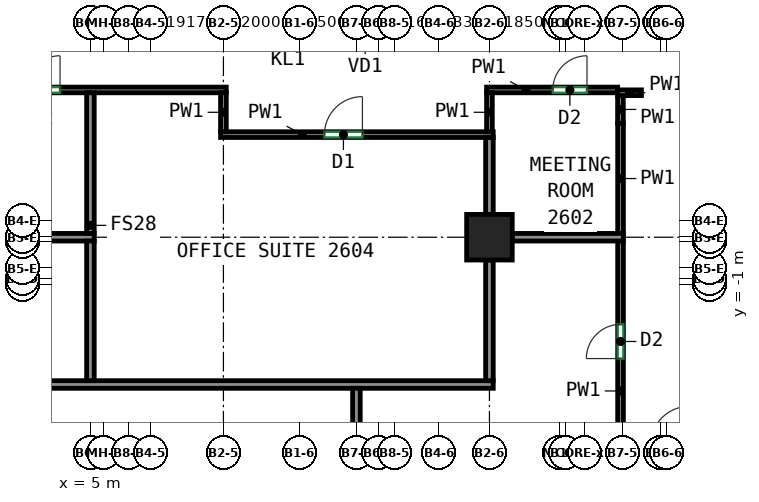
"""IFC4 building model, lengths in metres.
Left out: names, types, materials, properties, quantities, classifications, styles, units other than length and angle.
Written with IfcOpenShell. Run it as: python <this file> out.ifc"""

import sys

from ifc_helpers import new_model, si_unit, direction, frame, frame_2d, origin, origin_2d, place, context, subcontext, project, spatial, rectangle, extrude, source, transform, mapped, element, fill, save


model = new_model("IFC4")
c1 = context("Model", 3, precision=1e-05, world=origin(), true_north=direction((0.0, 1.0)))
c2 = subcontext(c1, "Body", "Model", "MODEL_VIEW")
j1 = project(units=[si_unit("LENGTHUNIT", "METRE"), si_unit("PLANEANGLEUNIT", "RADIAN")], contexts=[c1])
p1 = place(None, origin())
s1 = spatial("IfcSite", under=j1, at=p1, CompositionType="ELEMENT")
p2 = place(p1, origin())
s2 = spatial("IfcBuilding", under=s1, at=p2, CompositionType="ELEMENT")
p3 = place(p2, frame((0.0, 0.0, 112.6)))
s3 = spatial("IfcBuildingStorey", under=s2, at=p3, CompositionType="ELEMENT", Elevation=112.6)
m1 = source(origin(), c2, "Body", "SweptSolid", [
    extrude(rectangle(XDim=1.2, YDim=1.2, at=origin_2d()), origin(), (0.0, 0.0, 1.0), 3.72),
])
p4 = place(p3, frame((15.5, 0.25, 0.0), z_axis=(0.0, 0.0, 1.0), x_axis=(1.0, 0.0, 0.0)))
e1 = element("IfcColumn", 1, at=p4, inside=s3, PredefinedType="COLUMN", context=c2, shape_type="MappedRepresentation", body=[
    mapped(m1, transform((0.0, 0.0, 0.0))),
])
p5 = place(p3, frame((-2.075, 4.125, 0.0), z_axis=(0.0, 0.0, 1.0), x_axis=(1.0, 0.0, 0.0)))
e2 = element("IfcWall", 2, at=p5, inside=s3, PredefinedType="PARTITIONING", context=c2, shape_type="SweptSolid", body=[
    extrude(rectangle(XDim=10.65, YDim=0.15, at=frame_2d((5.325, 0.0))), origin(), (0.0, 0.0, 1.0), 3.72),
])
p6 = place(p5, frame((5.376, 0.0, 0.0)))
e3 = element("IfcOpeningElement", 3, at=p6, cuts=e2, PredefinedType="OPENING", context=c2, shape_type="SweptSolid", body=[
    extrude(rectangle(XDim=0.9, YDim=2.1, at=frame_2d((0.45, 1.05))), frame((0.0, 0.085, 0.0), z_axis=(0.0, -1.0, 0.0), x_axis=(1.0, 0.0, 0.0)), (0.0, 0.0, 1.0), 0.17),
])
p7 = place(p3, frame((8.425, 2.95, 0.0), z_axis=(0.0, 0.0, 1.0), x_axis=(1.0, 0.0, 0.0)))
e4 = element("IfcWall", 4, at=p7, inside=s3, PredefinedType="PARTITIONING", context=c2, shape_type="SweptSolid", body=[
    extrude(rectangle(XDim=7.175, YDim=0.15, at=frame_2d((3.587, 0.0))), origin(), (0.0, 0.0, 1.0), 3.72),
])
p8 = place(p7, frame((2.733, 0.0, 0.0)))
e5 = element("IfcOpeningElement", 5, at=p8, cuts=e4, PredefinedType="OPENING", context=c2, shape_type="SweptSolid", body=[
    extrude(rectangle(XDim=1.0, YDim=2.1, at=frame_2d((0.5, 1.05))), frame((0.0, 0.085, 0.0), z_axis=(0.0, -1.0, 0.0), x_axis=(1.0, 0.0, 0.0)), (0.0, 0.0, 1.0), 0.17),
])
p9 = place(p3, frame((8.5, 4.05, 0.0), z_axis=(0.0, 0.0, 1.0), x_axis=(0.0, -1.0, 0.0)))
e6 = element("IfcWall", 6, at=p9, inside=s3, PredefinedType="PARTITIONING", context=c2, shape_type="SweptSolid", body=[
    extrude(rectangle(XDim=1.025, YDim=0.15, at=frame_2d((0.513, 0.0))), origin(), (0.0, 0.0, 1.0), 3.72),
])
p10 = place(p3, frame((18.95, -7.75, 0.0), z_axis=(0.0, 0.0, 1.0), x_axis=(0.0, 1.0, 0.0)))
e7 = element("IfcWall", 7, at=p10, inside=s3, PredefinedType="PARTITIONING", context=c2, shape_type="SweptSolid", body=[
    extrude(rectangle(XDim=7.91, YDim=0.15, at=frame_2d((3.955, 0.0))), origin(), (0.0, 0.0, 1.0), 3.72),
])
p11 = place(p10, frame((4.807, 0.0, 0.0)))
e8 = element("IfcOpeningElement", 8, at=p11, cuts=e7, PredefinedType="OPENING", context=c2, shape_type="SweptSolid", body=[
    extrude(rectangle(XDim=0.9, YDim=2.1, at=frame_2d((0.45, 1.05))), frame((0.0, 0.085, 0.0), z_axis=(0.0, -1.0, 0.0), x_axis=(1.0, 0.0, 0.0)), (0.0, 0.0, 1.0), 0.17),
])
p12 = place(p3, frame((18.95, 0.34, 0.0), z_axis=(0.0, 0.0, 1.0), x_axis=(0.0, 1.0, 0.0)))
e9 = element("IfcWall", 9, at=p12, inside=s3, PredefinedType="PARTITIONING", context=c2, shape_type="SweptSolid", body=[
    extrude(rectangle(XDim=2.908, YDim=0.15, at=frame_2d((1.454, 0.0))), origin(), (0.0, 0.0, 1.0), 3.72),
])
p13 = place(p3, frame((18.948, 3.977, 0.0), z_axis=(0.0, 0.0, 1.0), x_axis=(0.0, -1.0, 0.0)))
e10 = element("IfcWall", 10, at=p13, inside=s3, PredefinedType="PARTITIONING", context=c2, shape_type="SweptSolid", body=[
    extrude(rectangle(XDim=0.729, YDim=0.15, at=frame_2d((0.365, 0.0))), origin(), (0.0, 0.0, 1.0), 3.72),
])
p14 = place(p3, frame((18.873, 4.052, 0.0), z_axis=(0.0, 0.0, 1.0), x_axis=(1.0, 0.0, 0.0)))
e11 = element("IfcWall", 11, at=p14, inside=s3, PredefinedType="PARTITIONING", context=c2, shape_type="SweptSolid", body=[
    extrude(rectangle(XDim=0.627, YDim=0.15, at=frame_2d((0.313, 0.0))), origin(), (0.0, 0.0, 1.0), 3.72),
])
p15 = place(p3, frame((15.425, 4.125, 0.0), z_axis=(0.0, 0.0, 1.0), x_axis=(1.0, 0.0, 0.0)))
e12 = element("IfcWall", 12, at=p15, inside=s3, PredefinedType="PARTITIONING", context=c2, shape_type="SweptSolid", body=[
    extrude(rectangle(XDim=3.448, YDim=0.15, at=frame_2d((1.724, 0.0))), origin(), (0.0, 0.0, 1.0), 3.72),
])
p16 = place(p15, frame((1.742, 0.0, 0.0)))
e13 = element("IfcOpeningElement", 13, at=p16, cuts=e12, PredefinedType="OPENING", context=c2, shape_type="SweptSolid", body=[
    extrude(rectangle(XDim=0.9, YDim=2.1, at=frame_2d((0.45, 1.05))), frame((0.0, 0.085, 0.0), z_axis=(0.0, -1.0, 0.0), x_axis=(1.0, 0.0, 0.0)), (0.0, 0.0, 1.0), 0.17),
])
p17 = place(p3, frame((15.5, 3.025, 0.0), z_axis=(0.0, 0.0, 1.0), x_axis=(0.0, 1.0, 0.0)))
e14 = element("IfcWall", 14, at=p17, inside=s3, PredefinedType="PARTITIONING", context=c2, shape_type="SweptSolid", body=[
    extrude(rectangle(XDim=1.025, YDim=0.15, at=frame_2d((0.513, 0.0))), origin(), (0.0, 0.0, 1.0), 3.72),
])
p18 = place(p3, frame((-17.874, -3.625, 0.0), z_axis=(0.0, 0.0, 1.0), x_axis=(1.0, 0.0, 0.0)))
e15 = element("IfcWall", 15, at=p18, inside=s3, PredefinedType="PARTITIONING", context=c2, shape_type="SweptSolid", body=[
    extrude(rectangle(XDim=33.474, YDim=0.2, at=frame_2d((16.737, 0.0))), origin(), (0.0, 0.0, 1.0), 3.72),
])
p19 = place(p3, frame((12.0, -11.275, 0.0), z_axis=(0.0, 0.0, 1.0), x_axis=(0.0, 1.0, 0.0)))
e16 = element("IfcWall", 16, at=p19, inside=s3, PredefinedType="PARTITIONING", context=c2, shape_type="SweptSolid", body=[
    extrude(rectangle(XDim=7.55, YDim=0.2, at=frame_2d((3.775, 0.0))), origin(), (0.0, 0.0, 1.0), 3.72),
])
p20 = place(p3, frame((-2.1, 0.25, 0.0), z_axis=(0.0, 0.0, 1.0), x_axis=(1.0, 0.0, 0.0)))
e17 = element("IfcWall", 17, at=p20, inside=s3, PredefinedType="PARTITIONING", context=c2, shape_type="SweptSolid", body=[
    extrude(rectangle(XDim=7.2, YDim=0.2, at=frame_2d((3.6, 0.0))), origin(), (0.0, 0.0, 1.0), 3.07),
])
p21 = place(p3, frame((5.0, -3.525, 0.0), z_axis=(0.0, 0.0, 1.0), x_axis=(0.0, 1.0, 0.0)))
e18 = element("IfcWall", 18, at=p21, inside=s3, PredefinedType="PARTITIONING", context=c2, shape_type="SweptSolid", body=[
    extrude(rectangle(XDim=3.675, YDim=0.2, at=frame_2d((1.837, 0.0))), origin(), (0.0, 0.0, 1.0), 3.72),
])
p22 = place(p3, frame((5.0, 0.35, 0.0), z_axis=(0.0, 0.0, 1.0), x_axis=(0.0, 1.0, 0.0)))
e19 = element("IfcWall", 19, at=p22, inside=s3, PredefinedType="PARTITIONING", context=c2, shape_type="SweptSolid", body=[
    extrude(rectangle(XDim=3.699, YDim=0.2, at=frame_2d((1.85, 0.0))), origin(), (0.0, 0.0, 1.0), 3.72),
])
p23 = place(p3, frame((15.5, -3.525, 0.0), z_axis=(0.0, 0.0, 1.0), x_axis=(0.0, 1.0, 0.0)))
e20 = element("IfcWall", 20, at=p23, inside=s3, PredefinedType="PARTITIONING", context=c2, shape_type="SweptSolid", body=[
    extrude(rectangle(XDim=3.175, YDim=0.2, at=frame_2d((1.587, 0.0))), origin(), (0.0, 0.0, 1.0), 3.72),
])
p24 = place(p3, frame((15.5, 0.85, 0.0), z_axis=(0.0, 0.0, 1.0), x_axis=(0.0, 1.0, 0.0)))
e21 = element("IfcWall", 21, at=p24, inside=s3, PredefinedType="PARTITIONING", context=c2, shape_type="SweptSolid", body=[
    extrude(rectangle(XDim=2.024, YDim=0.2, at=frame_2d((1.012, 0.0))), origin(), (0.0, 0.0, 1.0), 3.72),
])
p25 = place(p3, frame((16.1, 0.25, 0.0), z_axis=(0.0, 0.0, 1.0), x_axis=(1.0, 0.0, 0.0)))
e22 = element("IfcWall", 22, at=p25, inside=s3, PredefinedType="PARTITIONING", context=c2, shape_type="SweptSolid", body=[
    extrude(rectangle(XDim=2.924, YDim=0.2, at=frame_2d((1.462, 0.0))), origin(), (0.0, 0.0, 1.0), 3.72),
])
p26 = place(p11, origin())
e23 = element("IfcDoor", 23, at=p26, inside=s3, OperationType="SINGLE_SWING_LEFT", PredefinedType="DOOR", context=c2, shape_type="SweptSolid", body=[
    extrude(rectangle(XDim=0.9, YDim=2.1, at=frame_2d((0.45, 1.05))), frame((0.0, 0.025, 0.0), z_axis=(0.0, -1.0, 0.0), x_axis=(1.0, 0.0, 0.0)), (0.0, 0.0, 1.0), 0.05),
])
fill(e8, e23)
p27 = place(p8, origin())
e24 = element("IfcDoor", 24, at=p27, inside=s3, OperationType="SINGLE_SWING_RIGHT", PredefinedType="DOOR", context=c2, shape_type="SweptSolid", body=[
    extrude(rectangle(XDim=1.0, YDim=2.1, at=frame_2d((0.5, 1.05))), frame((0.0, 0.025, 0.0), z_axis=(0.0, -1.0, 0.0), x_axis=(1.0, 0.0, 0.0)), (0.0, 0.0, 1.0), 0.05),
])
fill(e5, e24)
p28 = place(p6, origin())
e25 = element("IfcDoor", 25, at=p28, inside=s3, OperationType="SINGLE_SWING_RIGHT", PredefinedType="DOOR", context=c2, shape_type="SweptSolid", body=[
    extrude(rectangle(XDim=0.9, YDim=2.1, at=frame_2d((0.45, 1.05))), frame((0.0, 0.025, 0.0), z_axis=(0.0, -1.0, 0.0), x_axis=(1.0, 0.0, 0.0)), (0.0, 0.0, 1.0), 0.05),
])
fill(e3, e25)
p29 = place(p16, origin())
e26 = element("IfcDoor", 26, at=p29, inside=s3, OperationType="SINGLE_SWING_RIGHT", PredefinedType="DOOR", context=c2, shape_type="SweptSolid", body=[
    extrude(rectangle(XDim=0.9, YDim=2.1, at=frame_2d((0.45, 1.05))), frame((0.0, 0.025, 0.0), z_axis=(0.0, -1.0, 0.0), x_axis=(1.0, 0.0, 0.0)), (0.0, 0.0, 1.0), 0.05),
])
fill(e13, e26)
save(model, sys.argv[1])
